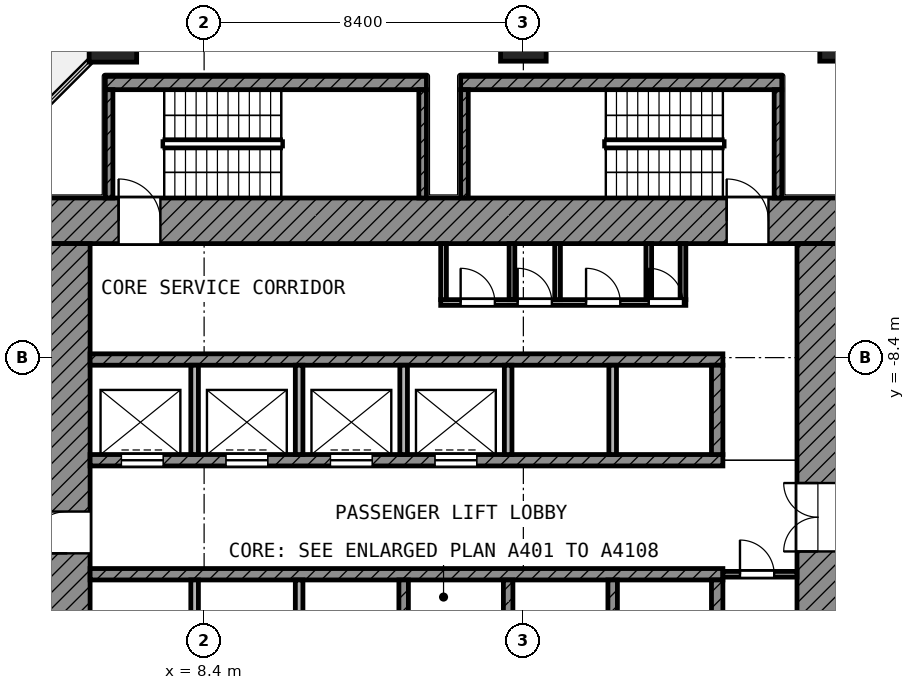
"""IFC4 building model, lengths in metres.
Left out: names, types, materials, properties, quantities, classifications, styles, units other than length and angle.
Written with IfcOpenShell. Run it as: python <this file> out.ifc"""

import sys

from ifc_helpers import new_model, si_unit, direction, frame, frame_2d, origin, origin_2d, place, context, subcontext, project, spatial, rectangle, extrude, element, fill, save


model = new_model("IFC4")
c1 = context("Model", 3, precision=1e-05, world=origin(), true_north=direction((0.0, 1.0)))
c2 = subcontext(c1, "Body", "Model", "MODEL_VIEW")
j1 = project(units=[si_unit("LENGTHUNIT", "METRE"), si_unit("PLANEANGLEUNIT", "RADIAN")], contexts=[c1])
p1 = place(None, origin())
s1 = spatial("IfcSite", under=j1, at=p1, CompositionType="ELEMENT")
p2 = place(p1, origin())
s2 = spatial("IfcBuilding", under=s1, at=p2, CompositionType="ELEMENT")
p3 = place(p2, frame((0.0, 0.0, 85.4)))
s3 = spatial("IfcBuildingStorey", under=s2, at=p3, CompositionType="ELEMENT", Elevation=85.4)
p4 = place(p3, frame((6.0, 0.0, 0.0), z_axis=(0.0, 0.0, 1.0), x_axis=(1.0, 0.0, 0.0)))
e1 = element("IfcColumn", 1, at=p4, inside=s3, PredefinedType="COLUMN", context=c2, shape_type="SweptSolid", body=[
    extrude(rectangle(XDim=1.25, YDim=1.25, at=origin_2d()), origin(), (0.0, 0.0, 1.0), 4.2),
])
for number, where, z_axis, x_axis in (
    (2, (16.8, 0.0, 0.0), (0.0, 0.0, 1.0), (1.0, 0.0, 0.0)),
    (3, (25.2, 0.0, 0.0), (0.0, 0.0, 1.0), (1.0, 0.0, 0.0)),
):
    element("IfcColumn", number, at=place(p3, frame(where, z_axis=z_axis, x_axis=x_axis)), inside=s3, PredefinedType="COLUMN", context=c2, shape_type="SweptSolid", body=[
        extrude(rectangle(XDim=1.2, YDim=1.2, at=origin_2d()), origin(), (0.0, 0.0, 1.0), 4.2),
    ])
p5 = place(p3, frame((4.2, -4.8, 0.0), z_axis=(0.0, 0.0, 1.0), x_axis=(1.0, 0.0, 0.0)))
e4 = element("IfcWall", 4, at=p5, inside=s3, PredefinedType="SHEAR", context=c2, shape_type="SweptSolid", body=[
    extrude(rectangle(XDim=20.9, YDim=1.2, at=frame_2d((10.45, 0.0))), origin(), (0.0, 0.0, 1.0), 3.9),
])
p6 = place(p5, frame((1.95, 0.0, 0.0)))
e5 = element("IfcOpeningElement", 5, at=p6, cuts=e4, PredefinedType="OPENING", context=c2, shape_type="SweptSolid", body=[
    extrude(rectangle(XDim=1.1, YDim=2.1, at=frame_2d((0.55, 1.05))), frame((0.0, 0.61, 0.0), z_axis=(0.0, -1.0, 0.0), x_axis=(1.0, 0.0, 0.0)), (0.0, 0.0, 1.0), 1.22),
])
p7 = place(p5, frame((17.95, 0.0, 0.0)))
e6 = element("IfcOpeningElement", 6, at=p7, cuts=e4, PredefinedType="OPENING", context=c2, shape_type="SweptSolid", body=[
    extrude(rectangle(XDim=1.1, YDim=2.1, at=frame_2d((0.55, 1.05))), frame((0.0, 0.61, 0.0), z_axis=(0.0, -1.0, 0.0), x_axis=(1.0, 0.0, 0.0)), (0.0, 0.0, 1.0), 1.22),
])
p8 = place(p3, frame((4.8, -25.1, 0.0), z_axis=(0.0, 0.0, 1.0), x_axis=(0.0, 1.0, 0.0)))
e7 = element("IfcWall", 7, at=p8, inside=s3, PredefinedType="SHEAR", context=c2, shape_type="SweptSolid", body=[
    extrude(rectangle(XDim=19.7, YDim=1.2, at=frame_2d((9.85, 0.0))), origin(), (0.0, 0.0, 1.0), 3.9),
])
p9 = place(p8, frame((11.55, 0.0, 0.0)))
e8 = element("IfcOpeningElement", 8, at=p9, cuts=e7, PredefinedType="OPENING", context=c2, shape_type="SweptSolid", body=[
    extrude(rectangle(XDim=1.1, YDim=2.1, at=frame_2d((0.55, 1.05))), frame((0.0, 0.61, 0.0), z_axis=(0.0, -1.0, 0.0), x_axis=(1.0, 0.0, 0.0)), (0.0, 0.0, 1.0), 1.22),
])
p10 = place(p8, frame((2.25, 0.0, 0.0)))
e9 = element("IfcOpeningElement", 9, at=p10, cuts=e7, PredefinedType="OPENING", context=c2, shape_type="SweptSolid", body=[
    extrude(rectangle(XDim=1.1, YDim=2.1, at=frame_2d((0.55, 1.05))), frame((0.0, 0.61, 0.0), z_axis=(0.0, -1.0, 0.0), x_axis=(1.0, 0.0, 0.0)), (0.0, 0.0, 1.0), 1.22),
])
p11 = place(p3, frame((24.55, -24.0, 0.0), z_axis=(0.0, 0.0, 1.0), x_axis=(0.0, 1.0, 0.0)))
e10 = element("IfcWall", 10, at=p11, inside=s3, PredefinedType="SHEAR", context=c2, shape_type="SweptSolid", body=[
    extrude(rectangle(XDim=18.6, YDim=1.1, at=frame_2d((9.3, 0.0))), origin(), (0.0, 0.0, 1.0), 3.9),
])
p12 = place(p11, frame((10.5, 0.0, 0.0)))
e11 = element("IfcOpeningElement", 11, at=p12, cuts=e10, PredefinedType="OPENING", context=c2, shape_type="SweptSolid", body=[
    extrude(rectangle(XDim=1.8, YDim=2.1, at=frame_2d((0.9, 1.05))), frame((0.0, 0.56, 0.0), z_axis=(0.0, -1.0, 0.0), x_axis=(1.0, 0.0, 0.0)), (0.0, 0.0, 1.0), 1.12),
])
p13 = place(p3, frame((5.4, -8.45, 0.0), z_axis=(0.0, 0.0, 1.0), x_axis=(1.0, 0.0, 0.0)))
e12 = element("IfcWall", 12, at=p13, inside=s3, PredefinedType="SHEAR", context=c2, shape_type="SweptSolid", body=[
    extrude(rectangle(XDim=16.65, YDim=0.3, at=frame_2d((8.325, 0.0))), origin(), (0.0, 0.0, 1.0), 3.9),
])
p14 = place(p3, frame((5.4, -11.1, 0.0), z_axis=(0.0, 0.0, 1.0), x_axis=(1.0, 0.0, 0.0)))
e13 = element("IfcWall", 13, at=p14, inside=s3, PredefinedType="SHEAR", context=c2, shape_type="SweptSolid", body=[
    extrude(rectangle(XDim=16.65, YDim=0.3, at=frame_2d((8.325, 0.0))), origin(), (0.0, 0.0, 1.0), 3.9),
])
p15 = place(p14, frame((0.825, 0.0, 0.0)))
e14 = element("IfcOpeningElement", 14, at=p15, cuts=e13, PredefinedType="OPENING", context=c2, shape_type="SweptSolid", body=[
    extrude(rectangle(XDim=1.1, YDim=2.1, at=frame_2d((0.55, 1.05))), frame((0.0, 0.16, 0.0), z_axis=(0.0, -1.0, 0.0), x_axis=(1.0, 0.0, 0.0)), (0.0, 0.0, 1.0), 0.32),
])
p16 = place(p14, frame((3.575, 0.0, 0.0)))
e15 = element("IfcOpeningElement", 15, at=p16, cuts=e13, PredefinedType="OPENING", context=c2, shape_type="SweptSolid", body=[
    extrude(rectangle(XDim=1.1, YDim=2.1, at=frame_2d((0.55, 1.05))), frame((0.0, 0.16, 0.0), z_axis=(0.0, -1.0, 0.0), x_axis=(1.0, 0.0, 0.0)), (0.0, 0.0, 1.0), 0.32),
])
p17 = place(p14, frame((6.325, 0.0, 0.0)))
e16 = element("IfcOpeningElement", 16, at=p17, cuts=e13, PredefinedType="OPENING", context=c2, shape_type="SweptSolid", body=[
    extrude(rectangle(XDim=1.1, YDim=2.1, at=frame_2d((0.55, 1.05))), frame((0.0, 0.16, 0.0), z_axis=(0.0, -1.0, 0.0), x_axis=(1.0, 0.0, 0.0)), (0.0, 0.0, 1.0), 0.32),
])
p18 = place(p14, frame((9.075, 0.0, 0.0)))
e17 = element("IfcOpeningElement", 17, at=p18, cuts=e13, PredefinedType="OPENING", context=c2, shape_type="SweptSolid", body=[
    extrude(rectangle(XDim=1.1, YDim=2.1, at=frame_2d((0.55, 1.05))), frame((0.0, 0.16, 0.0), z_axis=(0.0, -1.0, 0.0), x_axis=(1.0, 0.0, 0.0)), (0.0, 0.0, 1.0), 0.32),
])
p19 = place(p3, frame((5.4, -14.1, 0.0), z_axis=(0.0, 0.0, 1.0), x_axis=(1.0, 0.0, 0.0)))
e18 = element("IfcWall", 18, at=p19, inside=s3, PredefinedType="SHEAR", context=c2, shape_type="SweptSolid", body=[
    extrude(rectangle(XDim=16.65, YDim=0.3, at=frame_2d((8.325, 0.0))), origin(), (0.0, 0.0, 1.0), 3.9),
])
p20 = place(p3, frame((21.9, -10.95, 0.0), z_axis=(0.0, 0.0, 1.0), x_axis=(0.0, 1.0, 0.0)))
e19 = element("IfcWall", 19, at=p20, inside=s3, PredefinedType="SHEAR", context=c2, shape_type="SweptSolid", body=[
    extrude(rectangle(XDim=2.35, YDim=0.3, at=frame_2d((1.175, 0.0))), origin(), (0.0, 0.0, 1.0), 3.9),
])
p21 = place(p3, frame((21.9, -16.6, 0.0), z_axis=(0.0, 0.0, 1.0), x_axis=(0.0, 1.0, 0.0)))
e20 = element("IfcWall", 20, at=p21, inside=s3, PredefinedType="SHEAR", context=c2, shape_type="SweptSolid", body=[
    extrude(rectangle(XDim=2.35, YDim=0.3, at=frame_2d((1.175, 0.0))), origin(), (0.0, 0.0, 1.0), 3.9),
])
for number, where, z_axis, x_axis in (
    (21, (8.15, -10.95, 0.0), (0.0, 0.0, 1.0), (0.0, 1.0, 0.0)),
    (22, (10.9, -10.95, 0.0), (0.0, 0.0, 1.0), (0.0, 1.0, 0.0)),
    (23, (13.65, -10.95, 0.0), (0.0, 0.0, 1.0), (0.0, 1.0, 0.0)),
    (24, (16.4, -10.95, 0.0), (0.0, 0.0, 1.0), (0.0, 1.0, 0.0)),
    (25, (19.15, -10.95, 0.0), (0.0, 0.0, 1.0), (0.0, 1.0, 0.0)),
):
    element("IfcWall", number, at=place(p3, frame(where, z_axis=z_axis, x_axis=x_axis)), inside=s3, PredefinedType="PARTITIONING", context=c2, shape_type="SweptSolid", body=[
        extrude(rectangle(XDim=2.35, YDim=0.2, at=frame_2d((1.175, 0.0))), origin(), (0.0, 0.0, 1.0), 3.9),
    ])
for number, where, z_axis, x_axis in (
    (26, (8.15, -16.6, 0.0), (0.0, 0.0, 1.0), (0.0, 1.0, 0.0)),
    (27, (10.9, -16.6, 0.0), (0.0, 0.0, 1.0), (0.0, 1.0, 0.0)),
):
    element("IfcWall", number, at=place(p3, frame(where, z_axis=z_axis, x_axis=x_axis)), inside=s3, PredefinedType="PARTITIONING", context=c2, shape_type="SweptSolid", body=[
        extrude(rectangle(XDim=2.35, YDim=0.2, at=frame_2d((1.175, 0.0))), origin(), (0.0, 0.0, 1.0), 3.9),
    ])
for number, where, z_axis, x_axis in (
    (28, (13.65, -16.6, 0.0), (0.0, 0.0, 1.0), (0.0, 1.0, 0.0)),
    (29, (16.4, -16.6, 0.0), (0.0, 0.0, 1.0), (0.0, 1.0, 0.0)),
    (30, (19.15, -16.6, 0.0), (0.0, 0.0, 1.0), (0.0, 1.0, 0.0)),
):
    element("IfcWall", number, at=place(p3, frame(where, z_axis=z_axis, x_axis=x_axis)), inside=s3, PredefinedType="SHEAR", context=c2, shape_type="SweptSolid", body=[
        extrude(rectangle(XDim=2.35, YDim=0.25, at=frame_2d((1.175, 0.0))), origin(), (0.0, 0.0, 1.0), 3.9),
    ])
p22 = place(p3, frame((22.05, -14.1, 0.0), z_axis=(0.0, 0.0, 1.0), x_axis=(1.0, 0.0, 0.0)))
e31 = element("IfcWall", 31, at=p22, inside=s3, PredefinedType="PARTITIONING", context=c2, shape_type="SweptSolid", body=[
    extrude(rectangle(XDim=1.95, YDim=0.15, at=frame_2d((0.975, 0.0))), origin(), (0.0, 0.0, 1.0), 3.9),
])
p23 = place(p22, frame((0.45, 0.0, 0.0)))
e32 = element("IfcOpeningElement", 32, at=p23, cuts=e31, PredefinedType="OPENING", context=c2, shape_type="SweptSolid", body=[
    extrude(rectangle(XDim=0.9, YDim=2.1, at=frame_2d((0.45, 1.05))), frame((0.0, 0.085, 0.0), z_axis=(0.0, -1.0, 0.0), x_axis=(1.0, 0.0, 0.0)), (0.0, 0.0, 1.0), 0.17),
])
p24 = place(p3, frame((14.625, -6.95, 0.0), z_axis=(0.0, 0.0, 1.0), x_axis=(1.0, 0.0, 0.0)))
e33 = element("IfcWall", 33, at=p24, inside=s3, PredefinedType="PARTITIONING", context=c2, shape_type="SweptSolid", body=[
    extrude(rectangle(XDim=6.45, YDim=0.15, at=frame_2d((3.225, 0.0))), origin(), (0.0, 0.0, 1.0), 3.9),
])
p25 = place(p24, frame((0.525, 0.0, 0.0)))
e34 = element("IfcOpeningElement", 34, at=p25, cuts=e33, PredefinedType="OPENING", context=c2, shape_type="SweptSolid", body=[
    extrude(rectangle(XDim=0.9, YDim=2.1, at=frame_2d((0.45, 1.05))), frame((0.0, 0.085, 0.0), z_axis=(0.0, -1.0, 0.0), x_axis=(1.0, 0.0, 0.0)), (0.0, 0.0, 1.0), 0.17),
])
p26 = place(p24, frame((2.025, 0.0, 0.0)))
e35 = element("IfcOpeningElement", 35, at=p26, cuts=e33, PredefinedType="OPENING", context=c2, shape_type="SweptSolid", body=[
    extrude(rectangle(XDim=0.9, YDim=2.1, at=frame_2d((0.45, 1.05))), frame((0.0, 0.085, 0.0), z_axis=(0.0, -1.0, 0.0), x_axis=(1.0, 0.0, 0.0)), (0.0, 0.0, 1.0), 0.17),
])
p27 = place(p24, frame((3.825, 0.0, 0.0)))
e36 = element("IfcOpeningElement", 36, at=p27, cuts=e33, PredefinedType="OPENING", context=c2, shape_type="SweptSolid", body=[
    extrude(rectangle(XDim=0.9, YDim=2.1, at=frame_2d((0.45, 1.05))), frame((0.0, 0.085, 0.0), z_axis=(0.0, -1.0, 0.0), x_axis=(1.0, 0.0, 0.0)), (0.0, 0.0, 1.0), 0.17),
])
p28 = place(p24, frame((5.475, 0.0, 0.0)))
e37 = element("IfcOpeningElement", 37, at=p28, cuts=e33, PredefinedType="OPENING", context=c2, shape_type="SweptSolid", body=[
    extrude(rectangle(XDim=0.9, YDim=2.1, at=frame_2d((0.45, 1.05))), frame((0.0, 0.085, 0.0), z_axis=(0.0, -1.0, 0.0), x_axis=(1.0, 0.0, 0.0)), (0.0, 0.0, 1.0), 0.17),
])
for number, where, z_axis, x_axis in (
    (38, (14.7, -6.875, 0.0), (0.0, 0.0, 1.0), (0.0, 1.0, 0.0)),
    (39, (16.5, -6.875, 0.0), (0.0, 0.0, 1.0), (0.0, 1.0, 0.0)),
    (40, (17.7, -6.875, 0.0), (0.0, 0.0, 1.0), (0.0, 1.0, 0.0)),
    (41, (20.1, -6.875, 0.0), (0.0, 0.0, 1.0), (0.0, 1.0, 0.0)),
    (42, (21.0, -6.875, 0.0), (0.0, 0.0, 1.0), (0.0, 1.0, 0.0)),
):
    element("IfcWall", number, at=place(p3, frame(where, z_axis=z_axis, x_axis=x_axis)), inside=s3, PredefinedType="PARTITIONING", context=c2, shape_type="SweptSolid", body=[
        extrude(rectangle(XDim=1.475, YDim=0.15, at=frame_2d((0.738, 0.0))), origin(), (0.0, 0.0, 1.0), 3.9),
    ])
p29 = place(p3, frame((5.8, -1.175, 0.0), z_axis=(0.0, 0.0, 1.0), x_axis=(1.0, 0.0, 0.0)))
e43 = element("IfcWall", 43, at=p29, inside=s3, PredefinedType="SHEAR", context=c2, shape_type="SweptSolid", body=[
    extrude(rectangle(XDim=8.45, YDim=0.35, at=frame_2d((4.225, 0.0))), origin(), (0.0, 0.0, 1.0), 3.9),
])
for number, where, z_axis, x_axis in (
    (44, (5.9, -4.2, 0.0), (0.0, 0.0, 1.0), (0.0, 1.0, 0.0)),
    (45, (14.15, -4.2, 0.0), (0.0, 0.0, 1.0), (0.0, 1.0, 0.0)),
):
    element("IfcWall", number, at=place(p3, frame(where, z_axis=z_axis, x_axis=x_axis)), inside=s3, PredefinedType="SHEAR", context=c2, shape_type="SweptSolid", body=[
        extrude(rectangle(XDim=2.85, YDim=0.2, at=frame_2d((1.425, 0.0))), origin(), (0.0, 0.0, 1.0), 3.9),
    ])
p30 = place(p3, frame((15.15, -1.175, 0.0), z_axis=(0.0, 0.0, 1.0), x_axis=(1.0, 0.0, 0.0)))
e46 = element("IfcWall", 46, at=p30, inside=s3, PredefinedType="SHEAR", context=c2, shape_type="SweptSolid", body=[
    extrude(rectangle(XDim=8.45, YDim=0.35, at=frame_2d((4.225, 0.0))), origin(), (0.0, 0.0, 1.0), 3.9),
])
for number, where, z_axis, x_axis in (
    (47, (15.25, -4.2, 0.0), (0.0, 0.0, 1.0), (0.0, 1.0, 0.0)),
    (48, (23.5, -4.2, 0.0), (0.0, 0.0, 1.0), (0.0, 1.0, 0.0)),
):
    element("IfcWall", number, at=place(p3, frame(where, z_axis=z_axis, x_axis=x_axis)), inside=s3, PredefinedType="SHEAR", context=c2, shape_type="SweptSolid", body=[
        extrude(rectangle(XDim=2.85, YDim=0.2, at=frame_2d((1.425, 0.0))), origin(), (0.0, 0.0, 1.0), 3.9),
    ])
p31 = place(p15, origin())
e49 = element("IfcDoor", 49, at=p31, inside=s3, OperationType="DOUBLE_DOOR_SLIDING", PredefinedType="DOOR", context=c2, shape_type="SweptSolid", body=[
    extrude(rectangle(XDim=1.1, YDim=2.1, at=frame_2d((0.55, 1.05))), frame((0.0, 0.025, 0.0), z_axis=(0.0, -1.0, 0.0), x_axis=(1.0, 0.0, 0.0)), (0.0, 0.0, 1.0), 0.05),
])
fill(e14, e49)
p32 = place(p16, origin())
e50 = element("IfcDoor", 50, at=p32, inside=s3, OperationType="DOUBLE_DOOR_SLIDING", PredefinedType="DOOR", context=c2, shape_type="SweptSolid", body=[
    extrude(rectangle(XDim=1.1, YDim=2.1, at=frame_2d((0.55, 1.05))), frame((0.0, 0.025, 0.0), z_axis=(0.0, -1.0, 0.0), x_axis=(1.0, 0.0, 0.0)), (0.0, 0.0, 1.0), 0.05),
])
fill(e15, e50)
p33 = place(p17, origin())
e51 = element("IfcDoor", 51, at=p33, inside=s3, OperationType="DOUBLE_DOOR_SLIDING", PredefinedType="DOOR", context=c2, shape_type="SweptSolid", body=[
    extrude(rectangle(XDim=1.1, YDim=2.1, at=frame_2d((0.55, 1.05))), frame((0.0, 0.025, 0.0), z_axis=(0.0, -1.0, 0.0), x_axis=(1.0, 0.0, 0.0)), (0.0, 0.0, 1.0), 0.05),
])
fill(e16, e51)
p34 = place(p18, origin())
e52 = element("IfcDoor", 52, at=p34, inside=s3, OperationType="DOUBLE_DOOR_SLIDING", PredefinedType="DOOR", context=c2, shape_type="SweptSolid", body=[
    extrude(rectangle(XDim=1.1, YDim=2.1, at=frame_2d((0.55, 1.05))), frame((0.0, 0.025, 0.0), z_axis=(0.0, -1.0, 0.0), x_axis=(1.0, 0.0, 0.0)), (0.0, 0.0, 1.0), 0.05),
])
fill(e17, e52)
p35 = place(p9, origin())
e53 = element("IfcDoor", 53, at=p35, inside=s3, OperationType="SINGLE_SWING_LEFT", PredefinedType="DOOR", context=c2, shape_type="SweptSolid", body=[
    extrude(rectangle(XDim=1.1, YDim=2.1, at=frame_2d((0.55, 1.05))), frame((0.0, 0.025, 0.0), z_axis=(0.0, -1.0, 0.0), x_axis=(1.0, 0.0, 0.0)), (0.0, 0.0, 1.0), 0.05),
])
fill(e8, e53)
p36 = place(p6, origin())
e54 = element("IfcDoor", 54, at=p36, inside=s3, OperationType="SINGLE_SWING_LEFT", PredefinedType="DOOR", context=c2, shape_type="SweptSolid", body=[
    extrude(rectangle(XDim=1.1, YDim=2.1, at=frame_2d((0.55, 1.05))), frame((0.0, 0.025, 0.0), z_axis=(0.0, -1.0, 0.0), x_axis=(1.0, 0.0, 0.0)), (0.0, 0.0, 1.0), 0.05),
])
fill(e5, e54)
p37 = place(p7, origin())
e55 = element("IfcDoor", 55, at=p37, inside=s3, OperationType="SINGLE_SWING_LEFT", PredefinedType="DOOR", context=c2, shape_type="SweptSolid", body=[
    extrude(rectangle(XDim=1.1, YDim=2.1, at=frame_2d((0.55, 1.05))), frame((0.0, 0.025, 0.0), z_axis=(0.0, -1.0, 0.0), x_axis=(1.0, 0.0, 0.0)), (0.0, 0.0, 1.0), 0.05),
])
fill(e6, e55)
p38 = place(p12, origin())
e56 = element("IfcDoor", 56, at=p38, inside=s3, OperationType="DOUBLE_DOOR_SINGLE_SWING", PredefinedType="DOOR", context=c2, shape_type="SweptSolid", body=[
    extrude(rectangle(XDim=1.8, YDim=2.1, at=frame_2d((0.9, 1.05))), frame((0.0, 0.025, 0.0), z_axis=(0.0, -1.0, 0.0), x_axis=(1.0, 0.0, 0.0)), (0.0, 0.0, 1.0), 0.05),
])
fill(e11, e56)
p39 = place(p25, origin())
e57 = element("IfcDoor", 57, at=p39, inside=s3, OperationType="SINGLE_SWING_LEFT", PredefinedType="DOOR", context=c2, shape_type="SweptSolid", body=[
    extrude(rectangle(XDim=0.9, YDim=2.1, at=frame_2d((0.45, 1.05))), frame((0.0, 0.025, 0.0), z_axis=(0.0, -1.0, 0.0), x_axis=(1.0, 0.0, 0.0)), (0.0, 0.0, 1.0), 0.05),
])
fill(e34, e57)
p40 = place(p26, origin())
e58 = element("IfcDoor", 58, at=p40, inside=s3, OperationType="SINGLE_SWING_LEFT", PredefinedType="DOOR", context=c2, shape_type="SweptSolid", body=[
    extrude(rectangle(XDim=0.9, YDim=2.1, at=frame_2d((0.45, 1.05))), frame((0.0, 0.025, 0.0), z_axis=(0.0, -1.0, 0.0), x_axis=(1.0, 0.0, 0.0)), (0.0, 0.0, 1.0), 0.05),
])
fill(e35, e58)
p41 = place(p27, origin())
e59 = element("IfcDoor", 59, at=p41, inside=s3, OperationType="SINGLE_SWING_LEFT", PredefinedType="DOOR", context=c2, shape_type="SweptSolid", body=[
    extrude(rectangle(XDim=0.9, YDim=2.1, at=frame_2d((0.45, 1.05))), frame((0.0, 0.025, 0.0), z_axis=(0.0, -1.0, 0.0), x_axis=(1.0, 0.0, 0.0)), (0.0, 0.0, 1.0), 0.05),
])
fill(e36, e59)
p42 = place(p28, origin())
e60 = element("IfcDoor", 60, at=p42, inside=s3, OperationType="SINGLE_SWING_LEFT", PredefinedType="DOOR", context=c2, shape_type="SweptSolid", body=[
    extrude(rectangle(XDim=0.9, YDim=2.1, at=frame_2d((0.45, 1.05))), frame((0.0, 0.025, 0.0), z_axis=(0.0, -1.0, 0.0), x_axis=(1.0, 0.0, 0.0)), (0.0, 0.0, 1.0), 0.05),
])
fill(e37, e60)
p43 = place(p23, origin())
e61 = element("IfcDoor", 61, at=p43, inside=s3, OperationType="SINGLE_SWING_LEFT", PredefinedType="DOOR", context=c2, shape_type="SweptSolid", body=[
    extrude(rectangle(XDim=0.9, YDim=2.1, at=frame_2d((0.45, 1.05))), frame((0.0, 0.025, 0.0), z_axis=(0.0, -1.0, 0.0), x_axis=(1.0, 0.0, 0.0)), (0.0, 0.0, 1.0), 0.05),
])
fill(e32, e61)
save(model, sys.argv[1])
